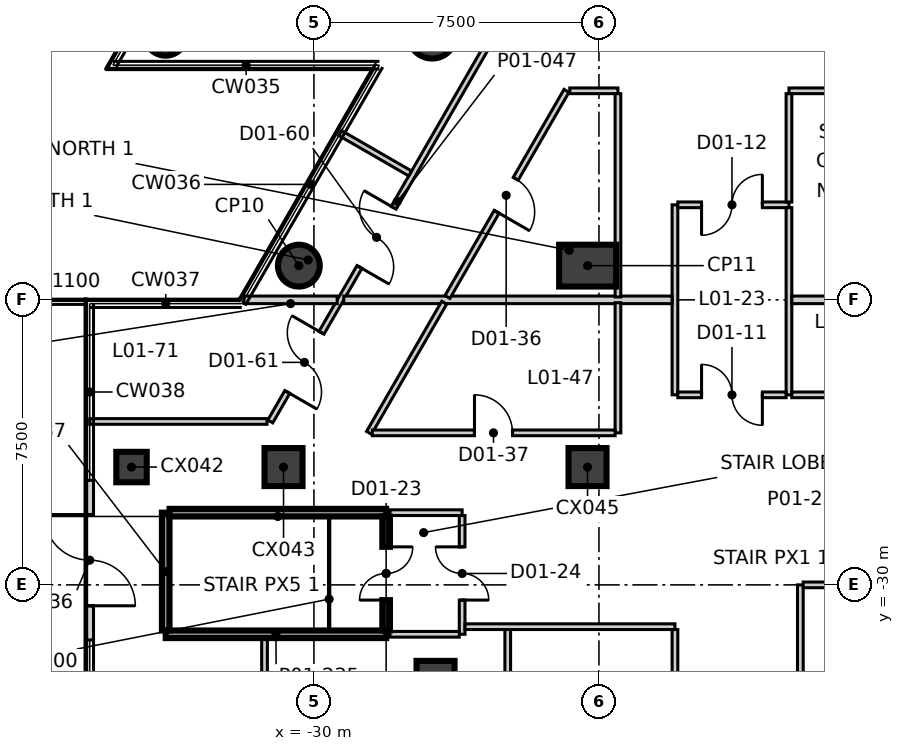
"""IFC4 building model, lengths in metres.
Left out: names, types, materials, properties, quantities, classifications, styles, units other than length and angle.
Written with IfcOpenShell. Run it as: python <this file> out.ifc"""

import sys

from ifc_helpers import new_model, si_unit, direction, frame, frame_2d, origin, origin_2d, place, context, subcontext, project, spatial, rectangle, circle, extrude, element, fill, save


model = new_model("IFC4")
c1 = context("Model", 3, precision=1e-05, world=origin(), true_north=direction((0.0, 1.0)))
c2 = subcontext(c1, "Body", "Model", "MODEL_VIEW")
j1 = project(units=[si_unit("LENGTHUNIT", "METRE"), si_unit("PLANEANGLEUNIT", "RADIAN")], contexts=[c1])
p1 = place(None, origin())
s1 = spatial("IfcSite", under=j1, at=p1, CompositionType="ELEMENT")
p2 = place(p1, origin())
s2 = spatial("IfcBuilding", under=s1, at=p2, CompositionType="ELEMENT")
p3 = place(p2, frame((0.0, 0.0, 8.5)))
s3 = spatial("IfcBuildingStorey", under=s2, at=p3, CompositionType="ELEMENT", Elevation=8.5)
for number, where, z_axis, x_axis in (
    (1, (-33.905, -15.525, -0.4), (0.0, 0.0, 1.0), (0.5, 0.866, 0.0)),
    (2, (-30.397, -21.6, -0.4), (0.0, 0.0, 1.0), (1.0, 0.0, 0.0)),
):
    element("IfcColumn", number, at=place(p3, frame(where, z_axis=z_axis, x_axis=x_axis)), inside=s3, PredefinedType="COLUMN", context=c2, shape_type="SweptSolid", body=[
        extrude(circle(Radius=0.55, at=origin_2d()), origin(), (0.0, 0.0, 1.0), 6.0),
    ])
p4 = place(p3, frame((-22.798, -21.6, -0.4), z_axis=(0.0, 0.0, 1.0), x_axis=(1.0, 0.0, 0.0)))
e3 = element("IfcColumn", 3, at=p4, inside=s3, PredefinedType="COLUMN", context=c2, shape_type="SweptSolid", body=[
    extrude(rectangle(XDim=1.5, YDim=1.1, at=origin_2d()), origin(), (0.0, 0.0, 1.0), 6.0),
])
p5 = place(p3, frame((-26.89, -15.525, -0.4), z_axis=(0.0, 0.0, 1.0), x_axis=(1.0, 0.0, 0.0)))
e4 = element("IfcColumn", 4, at=p5, inside=s3, PredefinedType="COLUMN", context=c2, shape_type="SweptSolid", body=[
    extrude(circle(Radius=0.625, at=origin_2d()), origin(), (0.0, 0.0, 1.0), 6.0),
])
p6 = place(p3, frame((-26.8, -32.5, -0.4), z_axis=(0.0, 0.0, 1.0), x_axis=(1.0, 0.0, 0.0)))
e5 = element("IfcColumn", 5, at=p6, inside=s3, PredefinedType="COLUMN", context=c2, shape_type="SweptSolid", body=[
    extrude(rectangle(XDim=1.0, YDim=1.0, at=origin_2d()), origin(), (0.0, 0.0, 1.0), 6.0),
])
p7 = place(p3, frame((-34.8, -26.9, -0.4), z_axis=(0.0, 0.0, 1.0), x_axis=(1.0, 0.0, 0.0)))
e6 = element("IfcColumn", 6, at=p7, inside=s3, PredefinedType="COLUMN", context=c2, shape_type="SweptSolid", body=[
    extrude(rectangle(XDim=0.8, YDim=0.8, at=origin_2d()), origin(), (0.0, 0.0, 1.0), 6.0),
])
for number, where, z_axis, x_axis in (
    (7, (-30.8, -26.9, -0.4), (0.0, 0.0, 1.0), (1.0, 0.0, 0.0)),
    (8, (-22.8, -26.9, -0.4), (0.0, 0.0, 1.0), (1.0, 0.0, 0.0)),
):
    element("IfcColumn", number, at=place(p3, frame(where, z_axis=z_axis, x_axis=x_axis)), inside=s3, PredefinedType="COLUMN", context=c2, shape_type="SweptSolid", body=[
        extrude(rectangle(XDim=1.0, YDim=1.0, at=origin_2d()), origin(), (0.0, 0.0, 1.0), 6.0),
    ])
p8 = place(p3, frame((-35.9, -27.25, 0.0), z_axis=(0.0, 0.0, 1.0), x_axis=(0.0, -1.0, 0.0)))
e9 = element("IfcWall", 9, at=p8, inside=s3, PredefinedType="ELEMENTEDWALL", context=c2, shape_type="SweptSolid", body=[
    extrude(rectangle(XDim=4.2, YDim=0.2, at=frame_2d((2.1, 0.0))), origin(), (0.0, 0.0, 1.0), 5.6),
])
p9 = place(p8, frame((0.9, 0.0, 0.0)))
e10 = element("IfcOpeningElement", 10, at=p9, cuts=e9, PredefinedType="OPENING", context=c2, shape_type="SweptSolid", body=[
    extrude(rectangle(XDim=2.4, YDim=2.4, at=frame_2d((1.2, 1.2))), frame((0.0, 0.11, 0.0), z_axis=(0.0, -1.0, 0.0), x_axis=(1.0, 0.0, 0.0)), (0.0, 0.0, 1.0), 0.22),
])
p10 = place(p3, frame((-28.0, -28.1, 0.0), z_axis=(0.0, 0.0, 1.0), x_axis=(1.0, 0.0, 0.0)))
e11 = element("IfcWall", 11, at=p10, inside=s3, PredefinedType="PARTITIONING", context=c2, shape_type="SweptSolid", body=[
    extrude(rectangle(XDim=1.9, YDim=0.15, at=frame_2d((0.95, 0.0))), origin(), (0.0, 0.0, 1.0), 5.6),
])
p11 = place(p3, frame((-26.1, -31.3, 0.0), z_axis=(0.0, 0.0, 1.0), x_axis=(0.0, 1.0, 0.0)))
e12 = element("IfcWall", 12, at=p11, inside=s3, PredefinedType="PARTITIONING", context=c2, shape_type="SweptSolid", body=[
    extrude(rectangle(XDim=3.125, YDim=0.15, at=frame_2d((1.562, 0.0))), origin(), (0.0, 0.0, 1.0), 5.6),
])
p12 = place(p11, frame((0.9, 0.0, 0.0)))
e13 = element("IfcOpeningElement", 13, at=p12, cuts=e12, PredefinedType="OPENING", context=c2, shape_type="SweptSolid", body=[
    extrude(rectangle(XDim=1.4, YDim=2.1, at=frame_2d((0.7, 1.05))), frame((0.0, 0.085, 0.0), z_axis=(0.0, -1.0, 0.0), x_axis=(1.0, 0.0, 0.0)), (0.0, 0.0, 1.0), 0.17),
])
p13 = place(p3, frame((-28.0, -31.3, 0.0), z_axis=(0.0, 0.0, 1.0), x_axis=(1.0, 0.0, 0.0)))
e14 = element("IfcWall", 14, at=p13, inside=s3, PredefinedType="PARTITIONING", context=c2, shape_type="SweptSolid", body=[
    extrude(rectangle(XDim=1.825, YDim=0.15, at=frame_2d((0.913, 0.0))), origin(), (0.0, 0.0, 1.0), 5.6),
])
p14 = place(p3, frame((-20.5, -25.0, 0.0), z_axis=(0.0, 0.0, 1.0), x_axis=(0.0, 1.0, 0.0)))
e15 = element("IfcWall", 15, at=p14, inside=s3, PredefinedType="PARTITIONING", context=c2, shape_type="SweptSolid", body=[
    extrude(rectangle(XDim=5.0, YDim=0.15, at=frame_2d((2.5, 0.0))), origin(), (0.0, 0.0, 1.0), 5.6),
])
p15 = place(p3, frame((-20.425, -20.0, 0.0), z_axis=(0.0, 0.0, 1.0), x_axis=(1.0, 0.0, 0.0)))
e16 = element("IfcWall", 16, at=p15, inside=s3, PredefinedType="PARTITIONING", context=c2, shape_type="SweptSolid", body=[
    extrude(rectangle(XDim=2.925, YDim=0.15, at=frame_2d((1.462, 0.0))), origin(), (0.0, 0.0, 1.0), 5.6),
])
p16 = place(p15, frame((0.625, 0.0, 0.0)))
e17 = element("IfcOpeningElement", 17, at=p16, cuts=e16, PredefinedType="OPENING", context=c2, shape_type="SweptSolid", body=[
    extrude(rectangle(XDim=1.6, YDim=2.1, at=frame_2d((0.8, 1.05))), frame((0.0, 0.085, 0.0), z_axis=(0.0, -1.0, 0.0), x_axis=(1.0, 0.0, 0.0)), (0.0, 0.0, 1.0), 0.17),
])
p17 = place(p3, frame((-17.5, -25.0, 0.0), z_axis=(0.0, 0.0, 1.0), x_axis=(0.0, 1.0, 0.0)))
e18 = element("IfcWall", 18, at=p17, inside=s3, PredefinedType="PARTITIONING", context=c2, shape_type="SweptSolid", body=[
    extrude(rectangle(XDim=4.925, YDim=0.15, at=frame_2d((2.462, 0.0))), origin(), (0.0, 0.0, 1.0), 5.6),
])
p18 = place(p3, frame((-20.425, -25.0, 0.0), z_axis=(0.0, 0.0, 1.0), x_axis=(1.0, 0.0, 0.0)))
e19 = element("IfcWall", 19, at=p18, inside=s3, PredefinedType="PARTITIONING", context=c2, shape_type="SweptSolid", body=[
    extrude(rectangle(XDim=2.85, YDim=0.15, at=frame_2d((1.425, 0.0))), origin(), (0.0, 0.0, 1.0), 5.6),
])
p19 = place(p18, frame((0.625, 0.0, 0.0)))
e20 = element("IfcOpeningElement", 20, at=p19, cuts=e19, PredefinedType="OPENING", context=c2, shape_type="SweptSolid", body=[
    extrude(rectangle(XDim=1.6, YDim=2.1, at=frame_2d((0.8, 1.05))), frame((0.0, 0.085, 0.0), z_axis=(0.0, -1.0, 0.0), x_axis=(1.0, 0.0, 0.0)), (0.0, 0.0, 1.0), 0.17),
])
p20 = place(p3, frame((-31.148, -25.7, 0.0), z_axis=(0.0, 0.0, 1.0), x_axis=(0.499948573786, 0.866055092687, 0.0)))
e21 = element("IfcWall", 21, at=p20, inside=s3, PredefinedType="PARTITIONING", context=c2, shape_type="SweptSolid", body=[
    extrude(rectangle(XDim=13.365, YDim=0.15, at=frame_2d((6.683, 0.0))), origin(), (0.0, 0.0, 1.0), 5.6),
])
p21 = place(p20, frame((4.693, 0.0, 0.0)))
e22 = element("IfcOpeningElement", 22, at=p21, cuts=e21, PredefinedType="OPENING", context=c2, shape_type="SweptSolid", body=[
    extrude(rectangle(XDim=1.8, YDim=2.1, at=frame_2d((0.9, 1.05))), frame((0.0, 0.085, 0.0), z_axis=(0.0, -1.0, 0.0), x_axis=(1.0, 0.0, 0.0)), (0.0, 0.0, 1.0), 0.17),
])
p22 = place(p20, frame((0.895, 0.0, 0.0)))
e23 = element("IfcOpeningElement", 23, at=p22, cuts=e21, PredefinedType="OPENING", context=c2, shape_type="SweptSolid", body=[
    extrude(rectangle(XDim=1.8, YDim=2.1, at=frame_2d((0.9, 1.05))), frame((0.0, 0.085, 0.0), z_axis=(0.0, -1.0, 0.0), x_axis=(1.0, 0.0, 0.0)), (0.0, 0.0, 1.0), 0.17),
])
p23 = place(p3, frame((-35.9, -25.7, 0.0), z_axis=(0.0, 0.0, 1.0), x_axis=(1.0, 0.0, 0.0)))
e24 = element("IfcWall", 24, at=p23, inside=s3, PredefinedType="PARTITIONING", context=c2, shape_type="SweptSolid", body=[
    extrude(rectangle(XDim=4.666, YDim=0.15, at=frame_2d((2.333, 0.0))), origin(), (0.0, 0.0, 1.0), 5.6),
])
p24 = place(p3, frame((-31.841, -22.5, 0.0), z_axis=(0.0, 0.0, 1.0), x_axis=(1.0, 0.0, 0.0)))
e25 = element("IfcWall", 25, at=p24, inside=s3, PredefinedType="SOLIDWALL", context=c2, shape_type="SweptSolid", body=[
    extrude(rectangle(XDim=2.454, YDim=0.2, at=frame_2d((1.227, 0.0))), origin(), (0.0, 0.0, 1.0), 5.6),
])
p25 = place(p3, frame((-29.214, -22.5, 0.0), z_axis=(0.0, 0.0, 1.0), x_axis=(1.0, 0.0, 0.0)))
e26 = element("IfcWall", 26, at=p25, inside=s3, PredefinedType="SOLIDWALL", context=c2, shape_type="SweptSolid", body=[
    extrude(rectangle(XDim=8.639, YDim=0.2, at=frame_2d((4.32, 0.0))), origin(), (0.0, 0.0, 1.0), 5.6),
])
p26 = place(p3, frame((-17.425, -22.5, 0.0), z_axis=(0.0, 0.0, 1.0), x_axis=(1.0, 0.0, 0.0)))
e27 = element("IfcWall", 27, at=p26, inside=s3, PredefinedType="SOLIDWALL", context=c2, shape_type="SweptSolid", body=[
    extrude(rectangle(XDim=34.85, YDim=0.2, at=frame_2d((17.425, 0.0))), origin(), (0.0, 0.0, 1.0), 5.6),
])
p27 = place(p3, frame((-31.3, -40.125, 0.0), z_axis=(0.0, 0.0, 1.0), x_axis=(0.0, 1.0, 0.0)))
e28 = element("IfcWall", 28, at=p27, inside=s3, PredefinedType="PARTITIONING", context=c2, shape_type="SweptSolid", body=[
    extrude(rectangle(XDim=8.725, YDim=0.15, at=frame_2d((4.363, 0.0))), origin(), (0.0, 0.0, 1.0), 5.6),
])
p28 = place(p27, frame((3.475, 0.0, 0.0)))
e29 = element("IfcOpeningElement", 29, at=p28, cuts=e28, PredefinedType="OPENING", context=c2, shape_type="SweptSolid", body=[
    extrude(rectangle(XDim=1.8, YDim=2.1, at=frame_2d((0.9, 1.05))), frame((0.0, 0.085, 0.0), z_axis=(0.0, -1.0, 0.0), x_axis=(1.0, 0.0, 0.0)), (0.0, 0.0, 1.0), 0.17),
])
p29 = place(p3, frame((-29.308, -18.113, 0.0), z_axis=(0.0, 0.0, 1.0), x_axis=(0.866214269573, -0.499672732084, 0.0)))
e30 = element("IfcWall", 30, at=p29, inside=s3, PredefinedType="PARTITIONING", context=c2, shape_type="SweptSolid", body=[
    extrude(rectangle(XDim=2.125, YDim=0.15, at=frame_2d((1.063, 0.0))), origin(), (0.0, 0.0, 1.0), 5.6),
])
p30 = place(p3, frame((-28.55, -26.0, 0.0), z_axis=(0.0, 0.0, 1.0), x_axis=(0.50010893147, 0.865962503036, 0.0)))
e31 = element("IfcWall", 31, at=p30, inside=s3, PredefinedType="PARTITIONING", context=c2, shape_type="SweptSolid", body=[
    extrude(rectangle(XDim=3.955, YDim=0.15, at=frame_2d((1.978, 0.0))), origin(), (0.0, 0.0, 1.0), 5.6),
])
p31 = place(p3, frame((-26.486, -22.425, 0.0), z_axis=(0.0, 0.0, 1.0), x_axis=(0.499991221239, 0.866030472145, 0.0)))
e32 = element("IfcWall", 32, at=p31, inside=s3, PredefinedType="PARTITIONING", context=c2, shape_type="SweptSolid", body=[
    extrude(rectangle(XDim=6.264, YDim=0.15, at=frame_2d((3.132, 0.0))), origin(), (0.0, 0.0, 1.0), 5.6),
])
p32 = place(p31, frame((2.589, 0.0, 0.0)))
e33 = element("IfcOpeningElement", 33, at=p32, cuts=e32, PredefinedType="OPENING", context=c2, shape_type="SweptSolid", body=[
    extrude(rectangle(XDim=1.0, YDim=2.1, at=frame_2d((0.5, 1.05))), frame((0.0, 0.085, 0.0), z_axis=(0.0, -1.0, 0.0), x_axis=(1.0, 0.0, 0.0)), (0.0, 0.0, 1.0), 0.17),
])
p33 = place(p3, frame((-23.267, -17.0, 0.0), z_axis=(0.0, 0.0, 1.0), x_axis=(1.0, 0.0, 0.0)))
e34 = element("IfcWall", 34, at=p33, inside=s3, PredefinedType="PARTITIONING", context=c2, shape_type="SweptSolid", body=[
    extrude(rectangle(XDim=1.267, YDim=0.15, at=frame_2d((0.634, 0.0))), origin(), (0.0, 0.0, 1.0), 5.6),
])
p34 = place(p3, frame((-17.5, -17.0, 0.0), z_axis=(0.0, 0.0, 1.0), x_axis=(1.0, 0.0, 0.0)))
e35 = element("IfcWall", 35, at=p34, inside=s3, PredefinedType="PARTITIONING", context=c2, shape_type="SweptSolid", body=[
    extrude(rectangle(XDim=4.5, YDim=0.15, at=frame_2d((2.25, 0.0))), origin(), (0.0, 0.0, 1.0), 5.6),
])
p35 = place(p3, frame((-22.0, -26.0, 0.0), z_axis=(0.0, 0.0, 1.0), x_axis=(0.0, 1.0, 0.0)))
e36 = element("IfcWall", 36, at=p35, inside=s3, PredefinedType="PARTITIONING", context=c2, shape_type="SweptSolid", body=[
    extrude(rectangle(XDim=3.425, YDim=0.15, at=frame_2d((1.712, 0.0))), origin(), (0.0, 0.0, 1.0), 5.6),
])
p36 = place(p3, frame((-22.0, -22.425, 0.0), z_axis=(0.0, 0.0, 1.0), x_axis=(0.0, 1.0, 0.0)))
e37 = element("IfcWall", 37, at=p36, inside=s3, PredefinedType="PARTITIONING", context=c2, shape_type="SweptSolid", body=[
    extrude(rectangle(XDim=5.35, YDim=0.15, at=frame_2d((2.675, 0.0))), origin(), (0.0, 0.0, 1.0), 5.6),
])
p37 = place(p3, frame((-28.463, -26.0, 0.0), z_axis=(0.0, 0.0, 1.0), x_axis=(1.0, 0.0, 0.0)))
e38 = element("IfcWall", 38, at=p37, inside=s3, PredefinedType="PARTITIONING", context=c2, shape_type="SweptSolid", body=[
    extrude(rectangle(XDim=6.388, YDim=0.15, at=frame_2d((3.194, 0.0))), origin(), (0.0, 0.0, 1.0), 5.6),
])
p38 = place(p37, frame((2.688, 0.0, 0.0)))
e39 = element("IfcOpeningElement", 39, at=p38, cuts=e38, PredefinedType="OPENING", context=c2, shape_type="SweptSolid", body=[
    extrude(rectangle(XDim=1.0, YDim=2.1, at=frame_2d((0.5, 1.05))), frame((0.0, 0.085, 0.0), z_axis=(0.0, -1.0, 0.0), x_axis=(1.0, 0.0, 0.0)), (0.0, 0.0, 1.0), 0.17),
])
p39 = place(p3, frame((-26.025, -31.1, 0.0), z_axis=(0.0, 0.0, 1.0), x_axis=(1.0, 0.0, 0.0)))
e40 = element("IfcWall", 40, at=p39, inside=s3, PredefinedType="PARTITIONING", context=c2, shape_type="SweptSolid", body=[
    extrude(rectangle(XDim=5.525, YDim=0.15, at=frame_2d((2.762, 0.0))), origin(), (0.0, 0.0, 1.0), 5.6),
])
p40 = place(p3, frame((-24.9, -40.125, 0.0), z_axis=(0.0, 0.0, 1.0), x_axis=(0.0, 1.0, 0.0)))
e41 = element("IfcWall", 41, at=p40, inside=s3, PredefinedType="PARTITIONING", context=c2, shape_type="SweptSolid", body=[
    extrude(rectangle(XDim=8.95, YDim=0.15, at=frame_2d((4.475, 0.0))), origin(), (0.0, 0.0, 1.0), 5.6),
])
p41 = place(p3, frame((-20.5, -37.0, 0.0), z_axis=(0.0, 0.0, 1.0), x_axis=(0.0, 1.0, 0.0)))
e42 = element("IfcWall", 42, at=p41, inside=s3, PredefinedType="PARTITIONING", context=c2, shape_type="SweptSolid", body=[
    extrude(rectangle(XDim=5.825, YDim=0.15, at=frame_2d((2.913, 0.0))), origin(), (0.0, 0.0, 1.0), 5.6),
])
p42 = place(p3, frame((-17.425, -25.0, 0.0), z_axis=(0.0, 0.0, 1.0), x_axis=(1.0, 0.0, 0.0)))
e43 = element("IfcWall", 43, at=p42, inside=s3, PredefinedType="PARTITIONING", context=c2, shape_type="SweptSolid", body=[
    extrude(rectangle(XDim=4.35, YDim=0.15, at=frame_2d((2.175, 0.0))), origin(), (0.0, 0.0, 1.0), 5.6),
])
p43 = place(p42, frame((1.675, 0.0, 0.0)))
e44 = element("IfcOpeningElement", 44, at=p43, cuts=e43, PredefinedType="OPENING", context=c2, shape_type="SweptSolid", body=[
    extrude(rectangle(XDim=1.0, YDim=2.1, at=frame_2d((0.5, 1.05))), frame((0.0, 0.085, 0.0), z_axis=(0.0, -1.0, 0.0), x_axis=(1.0, 0.0, 0.0)), (0.0, 0.0, 1.0), 0.17),
])
p44 = place(p3, frame((-17.5, -19.927, 0.0), z_axis=(0.0, 0.0, 1.0), x_axis=(0.0, 1.0, 0.0)))
e45 = element("IfcWall", 45, at=p44, inside=s3, PredefinedType="PARTITIONING", context=c2, shape_type="SweptSolid", body=[
    extrude(rectangle(XDim=2.852, YDim=0.15, at=frame_2d((1.426, 0.0))), origin(), (0.0, 0.0, 1.0), 5.6),
])
p45 = place(p3, frame((-17.2, -40.125, 0.0), z_axis=(0.0, 0.0, 1.0), x_axis=(0.0, 1.0, 0.0)))
e46 = element("IfcWall", 46, at=p45, inside=s3, PredefinedType="PARTITIONING", context=c2, shape_type="SweptSolid", body=[
    extrude(rectangle(XDim=10.125, YDim=0.15, at=frame_2d((5.062, 0.0))), origin(), (0.0, 0.0, 1.0), 5.6),
])
p46 = place(p45, frame((5.724, 0.0, 0.0)))
e47 = element("IfcOpeningElement", 47, at=p46, cuts=e46, PredefinedType="OPENING", context=c2, shape_type="SweptSolid", body=[
    extrude(rectangle(XDim=1.8, YDim=2.1, at=frame_2d((0.9, 1.05))), frame((0.0, 0.085, 0.0), z_axis=(0.0, -1.0, 0.0), x_axis=(1.0, 0.0, 0.0)), (0.0, 0.0, 1.0), 0.17),
])
p47 = place(p3, frame((-17.125, -30.0, 0.0), z_axis=(0.0, 0.0, 1.0), x_axis=(1.0, 0.0, 0.0)))
e48 = element("IfcWall", 48, at=p47, inside=s3, PredefinedType="PARTITIONING", context=c2, shape_type="SweptSolid", body=[
    extrude(rectangle(XDim=6.05, YDim=0.15, at=frame_2d((3.025, 0.0))), origin(), (0.0, 0.0, 1.0), 5.6),
])
p48 = place(p3, frame((-33.9, -31.3, 0.0), z_axis=(0.0, 0.0, 1.0), x_axis=(1.0, 0.0, 0.0)))
e49 = element("IfcWall", 49, at=p48, inside=s3, PredefinedType="SOLIDWALL", context=c2, shape_type="SweptSolid", body=[
    extrude(rectangle(XDim=5.8, YDim=0.2, at=frame_2d((2.9, 0.0))), origin(), (0.0, 0.0, 1.0), 5.6),
])
p49 = place(p3, frame((-33.9, -31.2, 0.0), z_axis=(0.0, 0.0, 1.0), x_axis=(0.0, 1.0, 0.0)))
e50 = element("IfcWall", 50, at=p49, inside=s3, PredefinedType="SOLIDWALL", context=c2, shape_type="SweptSolid", body=[
    extrude(rectangle(XDim=3.1, YDim=0.2, at=frame_2d((1.55, 0.0))), origin(), (0.0, 0.0, 1.0), 5.6),
])
p50 = place(p3, frame((-33.8, -28.1, 0.0), z_axis=(0.0, 0.0, 1.0), x_axis=(1.0, 0.0, 0.0)))
e51 = element("IfcWall", 51, at=p50, inside=s3, PredefinedType="SOLIDWALL", context=c2, shape_type="SweptSolid", body=[
    extrude(rectangle(XDim=5.7, YDim=0.2, at=frame_2d((2.85, 0.0))), origin(), (0.0, 0.0, 1.0), 5.6),
])
p51 = place(p3, frame((-28.1, -31.2, 0.0), z_axis=(0.0, 0.0, 1.0), x_axis=(0.0, 1.0, 0.0)))
e52 = element("IfcWall", 52, at=p51, inside=s3, PredefinedType="SOLIDWALL", context=c2, shape_type="SweptSolid", body=[
    extrude(rectangle(XDim=3.0, YDim=0.2, at=frame_2d((1.5, 0.0))), origin(), (0.0, 0.0, 1.0), 5.6),
])
p52 = place(p51, frame((0.8, 0.0, 0.0)))
e53 = element("IfcOpeningElement", 53, at=p52, cuts=e52, PredefinedType="OPENING", context=c2, shape_type="SweptSolid", body=[
    extrude(rectangle(XDim=1.4, YDim=2.1, at=frame_2d((0.7, 1.05))), frame((0.0, 0.11, 0.0), z_axis=(0.0, -1.0, 0.0), x_axis=(1.0, 0.0, 0.0)), (0.0, 0.0, 1.0), 0.22),
])
p53 = place(p9, frame((2.4, 0.0, 0.0), z_axis=(0.0, 0.0, 1.0), x_axis=(-1.0, 0.0, 0.0)))
e54 = element("IfcDoor", 54, at=p53, inside=s3, OperationType="DOUBLE_DOOR_SINGLE_SWING", PredefinedType="DOOR", context=c2, shape_type="SweptSolid", body=[
    extrude(rectangle(XDim=2.4, YDim=2.4, at=frame_2d((1.2, 1.2))), frame((0.0, 0.025, 0.0), z_axis=(0.0, -1.0, 0.0), x_axis=(1.0, 0.0, 0.0)), (0.0, 0.0, 1.0), 0.05),
])
fill(e10, e54)
p54 = place(p19, origin())
e55 = element("IfcDoor", 55, at=p54, inside=s3, OperationType="DOUBLE_DOOR_SINGLE_SWING", PredefinedType="DOOR", context=c2, shape_type="SweptSolid", body=[
    extrude(rectangle(XDim=1.6, YDim=2.1, at=frame_2d((0.8, 1.05))), frame((0.0, 0.025, 0.0), z_axis=(0.0, -1.0, 0.0), x_axis=(1.0, 0.0, 0.0)), (0.0, 0.0, 1.0), 0.05),
])
fill(e20, e55)
p55 = place(p16, origin())
e56 = element("IfcDoor", 56, at=p55, inside=s3, OperationType="DOUBLE_DOOR_SINGLE_SWING", PredefinedType="DOOR", context=c2, shape_type="SweptSolid", body=[
    extrude(rectangle(XDim=1.6, YDim=2.1, at=frame_2d((0.8, 1.05))), frame((0.0, 0.025, 0.0), z_axis=(0.0, -1.0, 0.0), x_axis=(1.0, 0.0, 0.0)), (0.0, 0.0, 1.0), 0.05),
])
fill(e17, e56)
p56 = place(p52, origin())
e57 = element("IfcDoor", 57, at=p56, inside=s3, OperationType="DOUBLE_DOOR_SINGLE_SWING", PredefinedType="DOOR", context=c2, shape_type="SweptSolid", body=[
    extrude(rectangle(XDim=1.4, YDim=2.1, at=frame_2d((0.7, 1.05))), frame((0.0, 0.025, 0.0), z_axis=(0.0, -1.0, 0.0), x_axis=(1.0, 0.0, 0.0)), (0.0, 0.0, 1.0), 0.05),
])
fill(e53, e57)
p57 = place(p12, origin())
e58 = element("IfcDoor", 58, at=p57, inside=s3, OperationType="DOUBLE_DOOR_SINGLE_SWING", PredefinedType="DOOR", context=c2, shape_type="SweptSolid", body=[
    extrude(rectangle(XDim=1.4, YDim=2.1, at=frame_2d((0.7, 1.05))), frame((0.0, 0.025, 0.0), z_axis=(0.0, -1.0, 0.0), x_axis=(1.0, 0.0, 0.0)), (0.0, 0.0, 1.0), 0.05),
])
fill(e13, e58)
p58 = place(p32, origin())
e59 = element("IfcDoor", 59, at=p58, inside=s3, OperationType="SINGLE_SWING_LEFT", PredefinedType="DOOR", context=c2, shape_type="SweptSolid", body=[
    extrude(rectangle(XDim=1.0, YDim=2.1, at=frame_2d((0.5, 1.05))), frame((0.0, 0.025, 0.0), z_axis=(0.0, -1.0, 0.0), x_axis=(1.0, 0.0, 0.0)), (0.0, 0.0, 1.0), 0.05),
])
fill(e33, e59)
p59 = place(p38, origin())
e60 = element("IfcDoor", 60, at=p59, inside=s3, OperationType="SINGLE_SWING_RIGHT", PredefinedType="DOOR", context=c2, shape_type="SweptSolid", body=[
    extrude(rectangle(XDim=1.0, YDim=2.1, at=frame_2d((0.5, 1.05))), frame((0.0, 0.025, 0.0), z_axis=(0.0, -1.0, 0.0), x_axis=(1.0, 0.0, 0.0)), (0.0, 0.0, 1.0), 0.05),
])
fill(e39, e60)
p60 = place(p21, origin())
e61 = element("IfcDoor", 61, at=p60, inside=s3, OperationType="DOUBLE_DOOR_SINGLE_SWING", PredefinedType="DOOR", context=c2, shape_type="SweptSolid", body=[
    extrude(rectangle(XDim=1.8, YDim=2.1, at=frame_2d((0.9, 1.05))), frame((0.0, 0.025, 0.0), z_axis=(0.0, -1.0, 0.0), x_axis=(1.0, 0.0, 0.0)), (0.0, 0.0, 1.0), 0.05),
])
fill(e22, e61)
p61 = place(p22, origin())
e62 = element("IfcDoor", 62, at=p61, inside=s3, OperationType="DOUBLE_DOOR_SINGLE_SWING", PredefinedType="DOOR", context=c2, shape_type="SweptSolid", body=[
    extrude(rectangle(XDim=1.8, YDim=2.1, at=frame_2d((0.9, 1.05))), frame((0.0, 0.025, 0.0), z_axis=(0.0, -1.0, 0.0), x_axis=(1.0, 0.0, 0.0)), (0.0, 0.0, 1.0), 0.05),
])
fill(e23, e62)
save(model, sys.argv[1])
